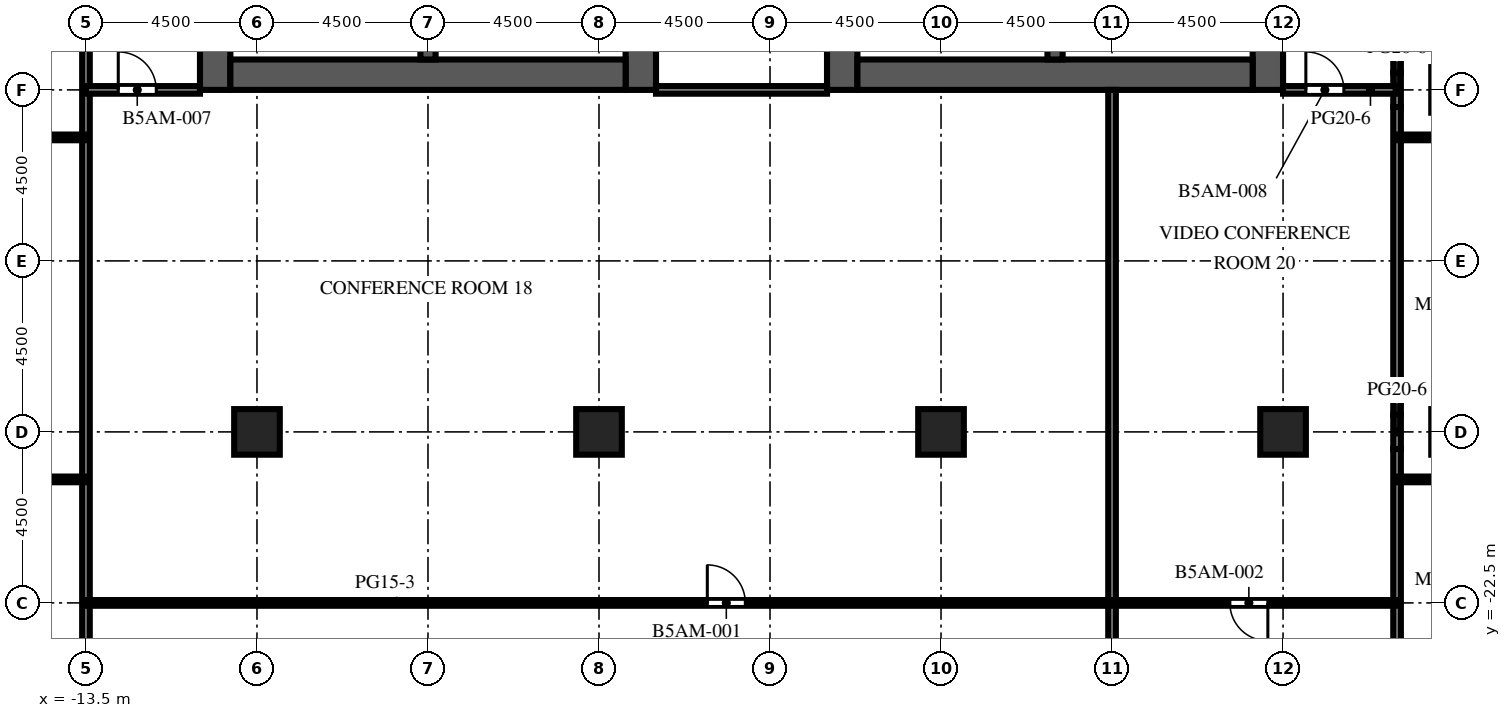
"""IFC4 building model, lengths in metres.
Left out: names, types, materials, properties, quantities, classifications, styles, units other than length and angle.
Written with IfcOpenShell. Run it as: python <this file> out.ifc"""

import sys

from ifc_helpers import new_model, si_unit, direction, frame, frame_2d, origin, origin_2d, place, context, subcontext, project, spatial, rectangle, extrude, element, fill, save


model = new_model("IFC4")
c1 = context("Model", 3, precision=1e-05, world=origin(), true_north=direction((0.0, 1.0)))
c2 = subcontext(c1, "Body", "Model", "MODEL_VIEW")
j1 = project(units=[si_unit("LENGTHUNIT", "METRE"), si_unit("PLANEANGLEUNIT", "RADIAN")], contexts=[c1])
p1 = place(None, origin())
s1 = spatial("IfcSite", under=j1, at=p1, CompositionType="ELEMENT")
p2 = place(p1, origin())
s2 = spatial("IfcBuilding", under=s1, at=p2, CompositionType="ELEMENT")
p3 = place(p2, frame((0.0, 0.0, 185.5)))
s3 = spatial("IfcBuildingStorey", under=s2, at=p3, CompositionType="ELEMENT", Elevation=185.5)
for number, where, z_axis, x_axis in (
    (1, (-9.0, -18.0, 0.0), (0.0, 0.0, 1.0), (1.0, 0.0, 0.0)),
    (2, (0.0, -18.0, 0.0), (0.0, 0.0, 1.0), (1.0, 0.0, 0.0)),
    (3, (9.0, -18.0, 0.0), (0.0, 0.0, 1.0), (1.0, 0.0, 0.0)),
):
    element("IfcColumn", number, at=place(p3, frame(where, z_axis=z_axis, x_axis=x_axis)), inside=s3, PredefinedType="COLUMN", context=c2, shape_type="SweptSolid", body=[
        extrude(rectangle(XDim=1.2, YDim=1.2, at=origin_2d()), origin(), (0.0, 0.0, 1.0), 6.0),
    ])
p4 = place(p3, frame((18.0, -18.0, 0.0), z_axis=(0.0, 0.0, 1.0), x_axis=(1.0, 0.0, 0.0)))
e4 = element("IfcColumn", 4, at=p4, inside=s3, PredefinedType="COLUMN", context=c2, shape_type="SweptSolid", body=[
    extrude(rectangle(XDim=1.2, YDim=1.2, at=origin_2d()), origin(), (0.0, 0.0, 1.0), 5.55),
])
p5 = place(p3, frame((-10.1, -9.0, 0.0), z_axis=(0.0, 0.0, 1.0), x_axis=(0.0, 1.0, 0.0)))
e5 = element("IfcWall", 5, at=p5, inside=s3, PredefinedType="SHEAR", context=c2, shape_type="SweptSolid", body=[
    extrude(rectangle(XDim=27.5, YDim=0.8, at=frame_2d((13.75, 0.0))), origin(), (0.0, 0.0, 1.0), 6.0),
])
p6 = place(p5, frame((12.55, 0.0, 0.0)))
e6 = element("IfcOpeningElement", 6, at=p6, cuts=e5, PredefinedType="OPENING", context=c2, shape_type="SweptSolid", body=[
    extrude(rectangle(XDim=2.4, YDim=2.4, at=frame_2d((1.2, 1.2))), frame((0.0, 0.41, 0.0), z_axis=(0.0, -1.0, 0.0), x_axis=(1.0, 0.0, 0.0)), (0.0, 0.0, 1.0), 0.82),
])
p7 = place(p5, frame((6.825, 0.0, 0.0)))
e7 = element("IfcOpeningElement", 7, at=p7, cuts=e5, PredefinedType="OPENING", context=c2, shape_type="SweptSolid", body=[
    extrude(rectangle(XDim=1.2, YDim=2.1, at=frame_2d((0.6, 1.05))), frame((0.0, 0.41, 0.0), z_axis=(0.0, -1.0, 0.0), x_axis=(1.0, 0.0, 0.0)), (0.0, 0.0, 1.0), 0.82),
])
p8 = place(p5, frame((19.475, 0.0, 0.0)))
e8 = element("IfcOpeningElement", 8, at=p8, cuts=e5, PredefinedType="OPENING", context=c2, shape_type="SweptSolid", body=[
    extrude(rectangle(XDim=1.2, YDim=2.1, at=frame_2d((0.6, 1.05))), frame((0.0, 0.41, 0.0), z_axis=(0.0, -1.0, 0.0), x_axis=(1.0, 0.0, 0.0)), (0.0, 0.0, 1.0), 0.82),
])
p9 = place(p3, frame((1.1, -9.0, 0.0), z_axis=(0.0, 0.0, 1.0), x_axis=(0.0, 1.0, 0.0)))
e9 = element("IfcWall", 9, at=p9, inside=s3, PredefinedType="SHEAR", context=c2, shape_type="SweptSolid", body=[
    extrude(rectangle(XDim=27.5, YDim=0.8, at=frame_2d((13.75, 0.0))), origin(), (0.0, 0.0, 1.0), 6.0),
])
p10 = place(p9, frame((12.55, 0.0, 0.0)))
e10 = element("IfcOpeningElement", 10, at=p10, cuts=e9, PredefinedType="OPENING", context=c2, shape_type="SweptSolid", body=[
    extrude(rectangle(XDim=2.4, YDim=2.4, at=frame_2d((1.2, 1.2))), frame((0.0, 0.41, 0.0), z_axis=(0.0, -1.0, 0.0), x_axis=(1.0, 0.0, 0.0)), (0.0, 0.0, 1.0), 0.82),
])
p11 = place(p9, frame((3.85, 0.0, 0.0)))
e11 = element("IfcOpeningElement", 11, at=p11, cuts=e9, PredefinedType="OPENING", context=c2, shape_type="SweptSolid", body=[
    extrude(rectangle(XDim=0.95, YDim=2.1, at=frame_2d((0.475, 1.05))), frame((0.0, 0.41, 0.0), z_axis=(0.0, -1.0, 0.0), x_axis=(1.0, 0.0, 0.0)), (0.0, 0.0, 1.0), 0.82),
])
p12 = place(p9, frame((23.475, 0.0, 0.0)))
e12 = element("IfcOpeningElement", 12, at=p12, cuts=e9, PredefinedType="OPENING", context=c2, shape_type="SweptSolid", body=[
    extrude(rectangle(XDim=1.2, YDim=2.1, at=frame_2d((0.6, 1.05))), frame((0.0, 0.41, 0.0), z_axis=(0.0, -1.0, 0.0), x_axis=(1.0, 0.0, 0.0)), (0.0, 0.0, 1.0), 0.82),
])
p13 = place(p3, frame((-9.7, -8.6, 0.0), z_axis=(0.0, 0.0, 1.0), x_axis=(1.0, 0.0, 0.0)))
e13 = element("IfcWall", 13, at=p13, inside=s3, PredefinedType="SHEAR", context=c2, shape_type="SweptSolid", body=[
    extrude(rectangle(XDim=10.4, YDim=0.8, at=frame_2d((5.2, 0.0))), origin(), (0.0, 0.0, 1.0), 6.0),
])
p14 = place(p3, frame((-4.5, -8.2, 0.0), z_axis=(0.0, 0.0, 1.0), x_axis=(0.0, 1.0, 0.0)))
e14 = element("IfcWall", 14, at=p14, inside=s3, PredefinedType="SHEAR", context=c2, shape_type="SweptSolid", body=[
    extrude(rectangle(XDim=7.5, YDim=0.4, at=frame_2d((3.75, 0.0))), origin(), (0.0, 0.0, 1.0), 6.0),
])
p15 = place(p3, frame((6.4, -9.0, 0.0), z_axis=(0.0, 0.0, 1.0), x_axis=(0.0, 1.0, 0.0)))
e15 = element("IfcWall", 15, at=p15, inside=s3, PredefinedType="SHEAR", context=c2, shape_type="SweptSolid", body=[
    extrude(rectangle(XDim=27.5, YDim=0.8, at=frame_2d((13.75, 0.0))), origin(), (0.0, 0.0, 1.0), 6.0),
])
p16 = place(p15, frame((12.55, 0.0, 0.0)))
e16 = element("IfcOpeningElement", 16, at=p16, cuts=e15, PredefinedType="OPENING", context=c2, shape_type="SweptSolid", body=[
    extrude(rectangle(XDim=2.4, YDim=2.4, at=frame_2d((1.2, 1.2))), frame((0.0, 0.41, 0.0), z_axis=(0.0, -1.0, 0.0), x_axis=(1.0, 0.0, 0.0)), (0.0, 0.0, 1.0), 0.82),
])
p17 = place(p15, frame((3.85, 0.0, 0.0)))
e17 = element("IfcOpeningElement", 17, at=p17, cuts=e15, PredefinedType="OPENING", context=c2, shape_type="SweptSolid", body=[
    extrude(rectangle(XDim=0.95, YDim=2.1, at=frame_2d((0.475, 1.05))), frame((0.0, 0.41, 0.0), z_axis=(0.0, -1.0, 0.0), x_axis=(1.0, 0.0, 0.0)), (0.0, 0.0, 1.0), 0.82),
])
p18 = place(p15, frame((23.475, 0.0, 0.0)))
e18 = element("IfcOpeningElement", 18, at=p18, cuts=e15, PredefinedType="OPENING", context=c2, shape_type="SweptSolid", body=[
    extrude(rectangle(XDim=1.2, YDim=2.1, at=frame_2d((0.6, 1.05))), frame((0.0, 0.41, 0.0), z_axis=(0.0, -1.0, 0.0), x_axis=(1.0, 0.0, 0.0)), (0.0, 0.0, 1.0), 0.82),
])
p19 = place(p3, frame((17.6, -9.0, 0.0), z_axis=(0.0, 0.0, 1.0), x_axis=(0.0, 1.0, 0.0)))
e19 = element("IfcWall", 19, at=p19, inside=s3, PredefinedType="SHEAR", context=c2, shape_type="SweptSolid", body=[
    extrude(rectangle(XDim=27.5, YDim=0.8, at=frame_2d((13.75, 0.0))), origin(), (0.0, 0.0, 1.0), 6.0),
])
p20 = place(p19, frame((12.55, 0.0, 0.0)))
e20 = element("IfcOpeningElement", 20, at=p20, cuts=e19, PredefinedType="OPENING", context=c2, shape_type="SweptSolid", body=[
    extrude(rectangle(XDim=2.4, YDim=2.4, at=frame_2d((1.2, 1.2))), frame((0.0, 0.41, 0.0), z_axis=(0.0, -1.0, 0.0), x_axis=(1.0, 0.0, 0.0)), (0.0, 0.0, 1.0), 0.82),
])
p21 = place(p19, frame((6.825, 0.0, 0.0)))
e21 = element("IfcOpeningElement", 21, at=p21, cuts=e19, PredefinedType="OPENING", context=c2, shape_type="SweptSolid", body=[
    extrude(rectangle(XDim=1.2, YDim=2.1, at=frame_2d((0.6, 1.05))), frame((0.0, 0.41, 0.0), z_axis=(0.0, -1.0, 0.0), x_axis=(1.0, 0.0, 0.0)), (0.0, 0.0, 1.0), 0.82),
])
p22 = place(p19, frame((19.475, 0.0, 0.0)))
e22 = element("IfcOpeningElement", 22, at=p22, cuts=e19, PredefinedType="OPENING", context=c2, shape_type="SweptSolid", body=[
    extrude(rectangle(XDim=1.2, YDim=2.1, at=frame_2d((0.6, 1.05))), frame((0.0, 0.41, 0.0), z_axis=(0.0, -1.0, 0.0), x_axis=(1.0, 0.0, 0.0)), (0.0, 0.0, 1.0), 0.82),
])
p23 = place(p3, frame((6.8, -8.6, 0.0), z_axis=(0.0, 0.0, 1.0), x_axis=(1.0, 0.0, 0.0)))
e23 = element("IfcWall", 23, at=p23, inside=s3, PredefinedType="SHEAR", context=c2, shape_type="SweptSolid", body=[
    extrude(rectangle(XDim=10.4, YDim=0.8, at=frame_2d((5.2, 0.0))), origin(), (0.0, 0.0, 1.0), 6.0),
])
p24 = place(p3, frame((12.0, -8.2, 0.0), z_axis=(0.0, 0.0, 1.0), x_axis=(0.0, 1.0, 0.0)))
e24 = element("IfcWall", 24, at=p24, inside=s3, PredefinedType="SHEAR", context=c2, shape_type="SweptSolid", body=[
    extrude(rectangle(XDim=7.5, YDim=0.4, at=frame_2d((3.75, 0.0))), origin(), (0.0, 0.0, 1.0), 6.0),
])
p25 = place(p3, frame((-13.5, -26.5, 0.0), z_axis=(0.0, 0.0, 1.0), x_axis=(0.0, 1.0, 0.0)))
e25 = element("IfcWall", 25, at=p25, inside=s3, PredefinedType="PARTITIONING", context=c2, shape_type="SweptSolid", body=[
    extrude(rectangle(XDim=29.75, YDim=0.2, at=frame_2d((14.875, 0.0))), origin(), (0.0, 0.0, 1.0), 5.55),
])
p26 = place(p3, frame((13.5, -26.5, 0.0), z_axis=(0.0, 0.0, 1.0), x_axis=(0.0, 1.0, 0.0)))
e26 = element("IfcWall", 26, at=p26, inside=s3, PredefinedType="PARTITIONING", context=c2, shape_type="SweptSolid", body=[
    extrude(rectangle(XDim=17.5, YDim=0.2, at=frame_2d((8.75, 0.0))), origin(), (0.0, 0.0, 1.0), 5.55),
])
p27 = place(p3, frame((21.0, -26.9, 0.0), z_axis=(0.0, 0.0, 1.0), x_axis=(0.0, 1.0, 0.0)))
e27 = element("IfcWall", 27, at=p27, inside=s3, PredefinedType="PARTITIONING", context=c2, shape_type="SweptSolid", body=[
    extrude(rectangle(XDim=8.45, YDim=0.2, at=frame_2d((4.225, 0.0))), origin(), (0.0, 0.0, 1.0), 5.55),
])
p28 = place(p3, frame((21.0, -18.45, 0.0), z_axis=(0.0, 0.0, 1.0), x_axis=(0.0, 1.0, 0.0)))
e28 = element("IfcWall", 28, at=p28, inside=s3, PredefinedType="PARTITIONING", context=c2, shape_type="SweptSolid", body=[
    extrude(rectangle(XDim=0.9, YDim=0.2, at=frame_2d((0.45, 0.0))), origin(), (0.0, 0.0, 1.0), 3.72),
])
p29 = place(p3, frame((21.0, -17.55, 0.0), z_axis=(0.0, 0.0, 1.0), x_axis=(0.0, 1.0, 0.0)))
e29 = element("IfcWall", 29, at=p29, inside=s3, PredefinedType="PARTITIONING", context=c2, shape_type="SweptSolid", body=[
    extrude(rectangle(XDim=8.1, YDim=0.2, at=frame_2d((4.05, 0.0))), origin(), (0.0, 0.0, 1.0), 5.55),
])
p30 = place(p3, frame((21.0, -9.45, 0.0), z_axis=(0.0, 0.0, 1.0), x_axis=(0.0, 1.0, 0.0)))
e30 = element("IfcWall", 30, at=p30, inside=s3, PredefinedType="PARTITIONING", context=c2, shape_type="SweptSolid", body=[
    extrude(rectangle(XDim=0.9, YDim=0.2, at=frame_2d((0.45, 0.0))), origin(), (0.0, 0.0, 1.0), 3.72),
])
p31 = place(p3, frame((21.0, -0.45, 0.0), z_axis=(0.0, 0.0, 1.0), x_axis=(0.0, -1.0, 0.0)))
e31 = element("IfcWall", 31, at=p31, inside=s3, PredefinedType="PARTITIONING", context=c2, shape_type="SweptSolid", body=[
    extrude(rectangle(XDim=8.1, YDim=0.2, at=frame_2d((4.05, 0.0))), origin(), (0.0, 0.0, 1.0), 5.55),
])
p32 = place(p31, frame((1.7, 0.0, 0.0)))
e32 = element("IfcOpeningElement", 32, at=p32, cuts=e31, PredefinedType="OPENING", context=c2, shape_type="SweptSolid", body=[
    extrude(rectangle(XDim=1.0, YDim=2.1, at=frame_2d((0.5, 1.05))), frame((0.0, 0.11, 0.0), z_axis=(0.0, -1.0, 0.0), x_axis=(1.0, 0.0, 0.0)), (0.0, 0.0, 1.0), 0.22),
])
p33 = place(p3, frame((21.0, -22.5, 0.0), z_axis=(0.0, 0.0, 1.0), x_axis=(-1.0, 0.0, 0.0)))
e33 = element("IfcWall", 33, at=p33, inside=s3, PredefinedType="PARTITIONING", context=c2, shape_type="SweptSolid", body=[
    extrude(rectangle(XDim=34.5, YDim=0.15, at=frame_2d((17.25, 0.0))), origin(), (0.0, 0.0, 1.0), 5.55),
])
p34 = place(p33, frame((17.15, 0.0, 0.0)))
e34 = element("IfcOpeningElement", 34, at=p34, cuts=e33, PredefinedType="OPENING", context=c2, shape_type="SweptSolid", body=[
    extrude(rectangle(XDim=1.0, YDim=2.1, at=frame_2d((0.5, 1.05))), frame((0.0, 0.085, 0.0), z_axis=(0.0, -1.0, 0.0), x_axis=(1.0, 0.0, 0.0)), (0.0, 0.0, 1.0), 0.17),
])
p35 = place(p33, frame((3.4, 0.0, 0.0)))
e35 = element("IfcOpeningElement", 35, at=p35, cuts=e33, PredefinedType="OPENING", context=c2, shape_type="SweptSolid", body=[
    extrude(rectangle(XDim=1.0, YDim=2.1, at=frame_2d((0.5, 1.05))), frame((0.0, 0.085, 0.0), z_axis=(0.0, -1.0, 0.0), x_axis=(1.0, 0.0, 0.0)), (0.0, 0.0, 1.0), 0.17),
])
p36 = place(p3, frame((-13.5, -19.25, 0.0), z_axis=(0.0, 0.0, 1.0), x_axis=(-1.0, 0.0, 0.0)))
e36 = element("IfcWall", 36, at=p36, inside=s3, PredefinedType="PARTITIONING", context=c2, shape_type="SweptSolid", body=[
    extrude(rectangle(XDim=8.55, YDim=0.15, at=frame_2d((4.275, 0.0))), origin(), (0.0, 0.0, 1.0), 5.55),
])
p37 = place(p36, frame((6.9, 0.0, 0.0)))
e37 = element("IfcOpeningElement", 37, at=p37, cuts=e36, PredefinedType="OPENING", context=c2, shape_type="SweptSolid", body=[
    extrude(rectangle(XDim=1.0, YDim=2.1, at=frame_2d((0.5, 1.05))), frame((0.0, 0.085, 0.0), z_axis=(0.0, -1.0, 0.0), x_axis=(1.0, 0.0, 0.0)), (0.0, 0.0, 1.0), 0.17),
])
p38 = place(p3, frame((26.9, -19.25, 0.0), z_axis=(0.0, 0.0, 1.0), x_axis=(-1.0, 0.0, 0.0)))
e38 = element("IfcWall", 38, at=p38, inside=s3, PredefinedType="PARTITIONING", context=c2, shape_type="SweptSolid", body=[
    extrude(rectangle(XDim=5.9, YDim=0.15, at=frame_2d((2.95, 0.0))), origin(), (0.0, 0.0, 1.0), 5.55),
])
p39 = place(p38, frame((2.3, 0.0, 0.0)))
e39 = element("IfcOpeningElement", 39, at=p39, cuts=e38, PredefinedType="OPENING", context=c2, shape_type="SweptSolid", body=[
    extrude(rectangle(XDim=1.0, YDim=2.1, at=frame_2d((0.5, 1.05))), frame((0.0, 0.085, 0.0), z_axis=(0.0, -1.0, 0.0), x_axis=(1.0, 0.0, 0.0)), (0.0, 0.0, 1.0), 0.17),
])
p40 = place(p3, frame((-13.5, -10.25, 0.0), z_axis=(0.0, 0.0, 1.0), x_axis=(-1.0, 0.0, 0.0)))
e40 = element("IfcWall", 40, at=p40, inside=s3, PredefinedType="PARTITIONING", context=c2, shape_type="SweptSolid", body=[
    extrude(rectangle(XDim=8.55, YDim=0.15, at=frame_2d((4.275, 0.0))), origin(), (0.0, 0.0, 1.0), 5.55),
])
p41 = place(p40, frame((6.4, 0.0, 0.0)))
e41 = element("IfcOpeningElement", 41, at=p41, cuts=e40, PredefinedType="OPENING", context=c2, shape_type="SweptSolid", body=[
    extrude(rectangle(XDim=1.0, YDim=2.1, at=frame_2d((0.5, 1.05))), frame((0.0, 0.085, 0.0), z_axis=(0.0, -1.0, 0.0), x_axis=(1.0, 0.0, 0.0)), (0.0, 0.0, 1.0), 0.17),
])
p42 = place(p3, frame((26.9, -10.25, 0.0), z_axis=(0.0, 0.0, 1.0), x_axis=(-1.0, 0.0, 0.0)))
e42 = element("IfcWall", 42, at=p42, inside=s3, PredefinedType="PARTITIONING", context=c2, shape_type="SweptSolid", body=[
    extrude(rectangle(XDim=5.9, YDim=0.15, at=frame_2d((2.95, 0.0))), origin(), (0.0, 0.0, 1.0), 5.55),
])
p43 = place(p42, frame((2.05, 0.0, 0.0)))
e43 = element("IfcOpeningElement", 43, at=p43, cuts=e42, PredefinedType="OPENING", context=c2, shape_type="SweptSolid", body=[
    extrude(rectangle(XDim=1.0, YDim=2.1, at=frame_2d((0.5, 1.05))), frame((0.0, 0.085, 0.0), z_axis=(0.0, -1.0, 0.0), x_axis=(1.0, 0.0, 0.0)), (0.0, 0.0, 1.0), 0.17),
])
p44 = place(p3, frame((-10.5, -9.0, 0.0), z_axis=(0.0, 0.0, 1.0), x_axis=(-1.0, 0.0, 0.0)))
e44 = element("IfcWall", 44, at=p44, inside=s3, PredefinedType="PARTITIONING", context=c2, shape_type="SweptSolid", body=[
    extrude(rectangle(XDim=3.0, YDim=0.2, at=frame_2d((1.5, 0.0))), origin(), (0.0, 0.0, 1.0), 5.55),
])
p45 = place(p44, frame((1.15, 0.0, 0.0)))
e45 = element("IfcOpeningElement", 45, at=p45, cuts=e44, PredefinedType="OPENING", context=c2, shape_type="SweptSolid", body=[
    extrude(rectangle(XDim=1.0, YDim=2.1, at=frame_2d((0.5, 1.05))), frame((0.0, 0.11, 0.0), z_axis=(0.0, -1.0, 0.0), x_axis=(1.0, 0.0, 0.0)), (0.0, 0.0, 1.0), 0.22),
])
p46 = place(p3, frame((1.5, -9.0, 0.0), z_axis=(0.0, 0.0, 1.0), x_axis=(1.0, 0.0, 0.0)))
e46 = element("IfcWall", 46, at=p46, inside=s3, PredefinedType="PARTITIONING", context=c2, shape_type="SweptSolid", body=[
    extrude(rectangle(XDim=4.5, YDim=0.2, at=frame_2d((2.25, 0.0))), origin(), (0.0, 0.0, 1.0), 5.55),
])
p47 = place(p3, frame((21.0, -9.0, 0.0), z_axis=(0.0, 0.0, 1.0), x_axis=(-1.0, 0.0, 0.0)))
e47 = element("IfcWall", 47, at=p47, inside=s3, PredefinedType="PARTITIONING", context=c2, shape_type="SweptSolid", body=[
    extrude(rectangle(XDim=3.0, YDim=0.2, at=frame_2d((1.5, 0.0))), origin(), (0.0, 0.0, 1.0), 3.72),
])
p48 = place(p47, frame((1.4, 0.0, 0.0)))
e48 = element("IfcOpeningElement", 48, at=p48, cuts=e47, PredefinedType="OPENING", context=c2, shape_type="SweptSolid", body=[
    extrude(rectangle(XDim=1.0, YDim=2.1, at=frame_2d((0.5, 1.05))), frame((0.0, 0.11, 0.0), z_axis=(0.0, -1.0, 0.0), x_axis=(1.0, 0.0, 0.0)), (0.0, 0.0, 1.0), 0.22),
])
p49 = place(p34, origin())
e49 = element("IfcDoor", 49, at=p49, inside=s3, OperationType="SINGLE_SWING_RIGHT", PredefinedType="DOOR", context=c2, shape_type="SweptSolid", body=[
    extrude(rectangle(XDim=1.0, YDim=2.1, at=frame_2d((0.5, 1.05))), frame((0.0, 0.025, 0.0), z_axis=(0.0, -1.0, 0.0), x_axis=(1.0, 0.0, 0.0)), (0.0, 0.0, 1.0), 0.05),
])
fill(e34, e49)
p50 = place(p35, origin())
e50 = element("IfcDoor", 50, at=p50, inside=s3, OperationType="SINGLE_SWING_LEFT", PredefinedType="DOOR", context=c2, shape_type="SweptSolid", body=[
    extrude(rectangle(XDim=1.0, YDim=2.1, at=frame_2d((0.5, 1.05))), frame((0.0, 0.025, 0.0), z_axis=(0.0, -1.0, 0.0), x_axis=(1.0, 0.0, 0.0)), (0.0, 0.0, 1.0), 0.05),
])
fill(e35, e50)
p51 = place(p45, origin())
e51 = element("IfcDoor", 51, at=p51, inside=s3, OperationType="SINGLE_SWING_RIGHT", PredefinedType="DOOR", context=c2, shape_type="SweptSolid", body=[
    extrude(rectangle(XDim=1.0, YDim=2.1, at=frame_2d((0.5, 1.05))), frame((0.0, 0.025, 0.0), z_axis=(0.0, -1.0, 0.0), x_axis=(1.0, 0.0, 0.0)), (0.0, 0.0, 1.0), 0.05),
])
fill(e45, e51)
p52 = place(p48, origin())
e52 = element("IfcDoor", 52, at=p52, inside=s3, OperationType="SINGLE_SWING_RIGHT", PredefinedType="DOOR", context=c2, shape_type="SweptSolid", body=[
    extrude(rectangle(XDim=1.0, YDim=2.1, at=frame_2d((0.5, 1.05))), frame((0.0, 0.025, 0.0), z_axis=(0.0, -1.0, 0.0), x_axis=(1.0, 0.0, 0.0)), (0.0, 0.0, 1.0), 0.05),
])
fill(e48, e52)
save(model, sys.argv[1])
